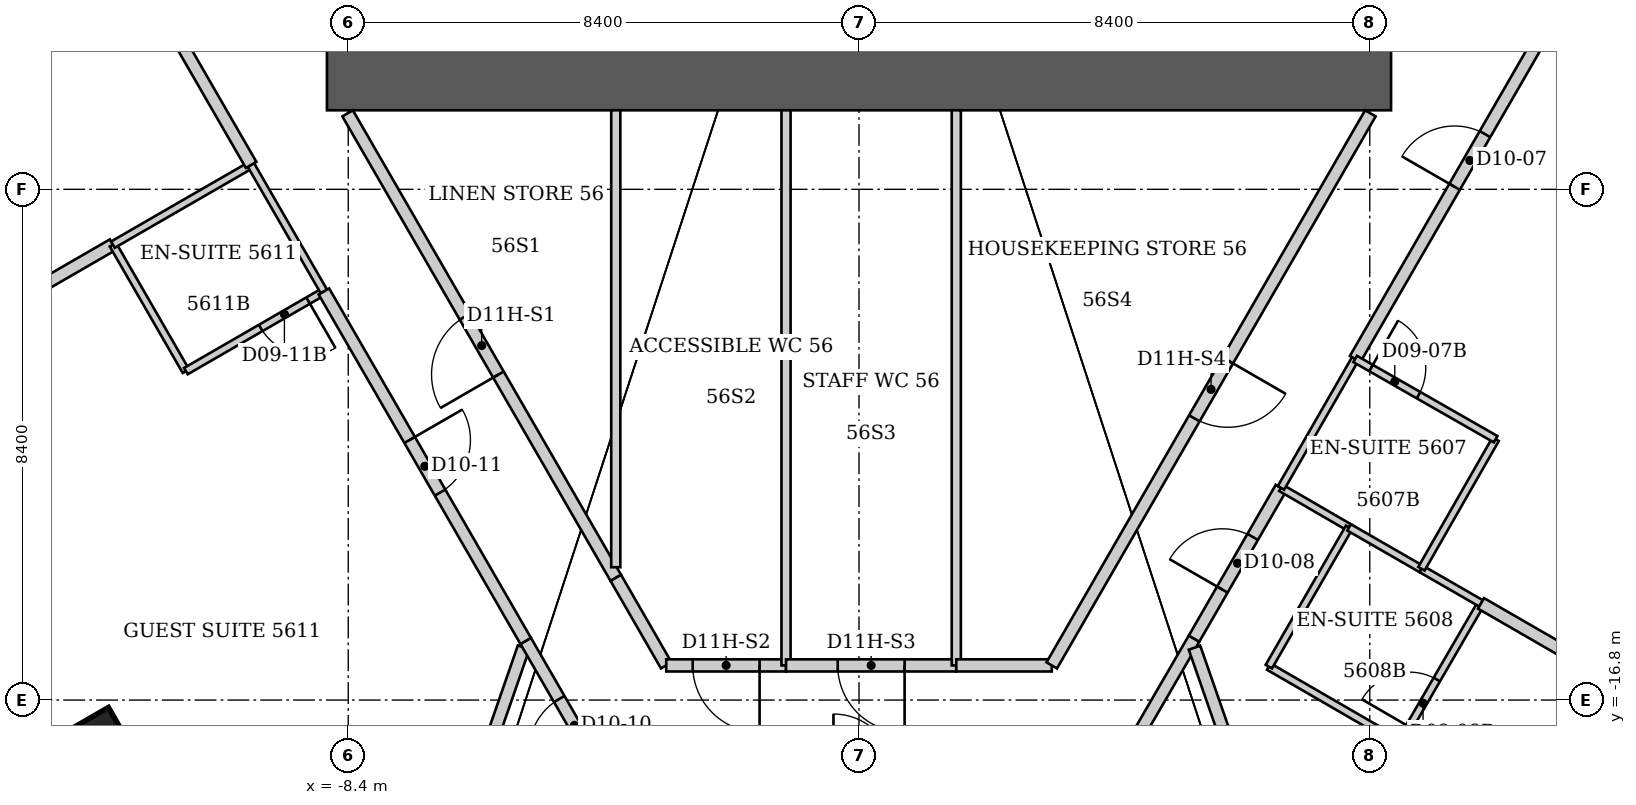
"""IFC4 building model, lengths in metres.
Left out: names, types, materials, properties, quantities, classifications, styles, units other than length and angle.
Written with IfcOpenShell. Run it as: python <this file> out.ifc"""

import sys

from ifc_helpers import new_model, si_unit, direction, frame, frame_2d, origin, origin_2d, place, context, subcontext, project, spatial, rectangle, extrude, element, fill, save


model = new_model("IFC4")
c1 = context("Model", 3, precision=1e-05, world=origin(), true_north=direction((0.0, 1.0)))
c2 = subcontext(c1, "Body", "Model", "MODEL_VIEW")
j1 = project(units=[si_unit("LENGTHUNIT", "METRE"), si_unit("PLANEANGLEUNIT", "RADIAN")], contexts=[c1])
p1 = place(None, origin())
s1 = spatial("IfcSite", under=j1, at=p1, CompositionType="ELEMENT")
p2 = place(p1, origin())
s2 = spatial("IfcBuilding", under=s1, at=p2, CompositionType="ELEMENT")
p3 = place(p2, frame((0.0, 0.0, 225.0)))
s3 = spatial("IfcBuildingStorey", under=s2, at=p3, CompositionType="ELEMENT", Elevation=225.0)
p4 = place(p3, frame((-12.618, -17.945, 0.0), z_axis=(0.0, 0.0, 1.0), x_axis=(-0.866025403784, -0.5, 0.0)))
e1 = element("IfcColumn", 1, at=p4, inside=s3, PredefinedType="COLUMN", context=c2, shape_type="SweptSolid", body=[
    extrude(rectangle(XDim=1.5, YDim=1.5, at=origin_2d()), origin(), (0.0, 0.0, 1.0), 3.8),
])
p5 = place(p3, frame((-8.75, -6.6, 0.0), z_axis=(0.0, 0.0, 1.0), x_axis=(1.0, 0.0, 0.0)))
e2 = element("IfcWall", 2, at=p5, inside=s3, PredefinedType="SHEAR", context=c2, shape_type="SweptSolid", body=[
    extrude(rectangle(XDim=17.5, YDim=1.0, at=frame_2d((8.75, 0.0))), origin(), (0.0, 0.0, 1.0), 3.8),
])
p6 = place(p3, frame((-17.256, -12.19, 0.0), z_axis=(0.0, 0.0, 1.0), x_axis=(0.865937714159, 0.500151852138, 0.0)))
e3 = element("IfcWall", 3, at=p6, inside=s3, PredefinedType="PARTITIONING", context=c2, shape_type="SweptSolid", body=[
    extrude(rectangle(XDim=5.758, YDim=0.2, at=frame_2d((2.879, 0.0))), origin(), (0.0, 0.0, 1.0), 3.038),
])
p7 = place(p3, frame((-12.27, -9.31, 0.0), z_axis=(0.0, 0.0, 1.0), x_axis=(0.499737123639, -0.866177122335, 0.0)))
e4 = element("IfcWall", 4, at=p7, inside=s3, PredefinedType="PARTITIONING", context=c2, shape_type="SweptSolid", body=[
    extrude(rectangle(XDim=2.401, YDim=0.12, at=frame_2d((1.201, 0.0))), origin(), (0.0, 0.0, 1.0), 3.64),
])
p8 = place(p3, frame((-12.27, -9.31, 0.0), z_axis=(0.0, 0.0, 1.0), x_axis=(0.866114241029, 0.499846097802, 0.0)))
e5 = element("IfcWall", 5, at=p8, inside=s3, PredefinedType="PARTITIONING", context=c2, shape_type="SweptSolid", body=[
    extrude(rectangle(XDim=2.621, YDim=0.12, at=frame_2d((1.311, 0.0))), origin(), (0.0, 0.0, 1.0), 3.038),
])
p9 = place(p3, frame((-11.07, -11.39, 0.0), z_axis=(0.0, 0.0, 1.0), x_axis=(0.866154567199, 0.49977621564, 0.0)))
e6 = element("IfcWall", 6, at=p9, inside=s3, PredefinedType="PARTITIONING", context=c2, shape_type="SweptSolid", body=[
    extrude(rectangle(XDim=2.621, YDim=0.12, at=frame_2d((1.311, 0.0))), origin(), (0.0, 0.0, 1.0), 3.64),
])
p10 = place(p9, frame((1.421, 0.0, 0.0)))
e7 = element("IfcOpeningElement", 7, at=p10, cuts=e6, PredefinedType="OPENING", context=c2, shape_type="SweptSolid", body=[
    extrude(rectangle(XDim=0.9, YDim=2.03, at=frame_2d((0.45, 1.015))), frame((0.0, 0.06, 0.0), z_axis=(0.0, -1.0, 0.0), x_axis=(1.0, 0.0, 0.0)), (0.0, 0.0, 1.0), 0.12),
])
p11 = place(p3, frame((-10.0, -8.0, 0.0), z_axis=(0.0, 0.0, 1.0), x_axis=(0.499693115345, -0.866202511239, 0.0)))
e8 = element("IfcWall", 8, at=p11, inside=s3, PredefinedType="PARTITIONING", context=c2, shape_type="SweptSolid", body=[
    extrude(rectangle(XDim=2.401, YDim=0.12, at=frame_2d((1.201, 0.0))), origin(), (0.0, 0.0, 1.0), 3.64),
])
p12 = place(p3, frame((-9.997, -7.998, 0.0), z_axis=(0.0, 0.0, 1.0), x_axis=(-0.499699067435, 0.866199077582, 0.0)))
e9 = element("IfcWall", 9, at=p12, inside=s3, PredefinedType="PARTITIONING", context=c2, shape_type="SweptSolid", body=[
    extrude(rectangle(XDim=7.531, YDim=0.2, at=frame_2d((3.766, 0.0))), origin(), (0.0, 0.0, 1.0), 3.64),
])
p13 = place(p12, frame((3.266, 0.0, 0.0)))
e10 = element("IfcOpeningElement", 10, at=p13, cuts=e9, PredefinedType="OPENING", context=c2, shape_type="SweptSolid", body=[
    extrude(rectangle(XDim=1.0, YDim=2.13, at=frame_2d((0.5, 1.065))), frame((0.0, 0.1, 0.0), z_axis=(0.0, -1.0, 0.0), x_axis=(1.0, 0.0, 0.0)), (0.0, 0.0, 1.0), 0.2),
])
p14 = place(p3, frame((-9.01, -26.012, 0.0), z_axis=(0.0, 0.0, 1.0), x_axis=(0.327582991606, 0.944822408504, 0.0)))
e11 = element("IfcWall", 11, at=p14, inside=s3, PredefinedType="PARTITIONING", context=c2, shape_type="SweptSolid", body=[
    extrude(rectangle(XDim=10.667, YDim=0.2, at=frame_2d((5.333, 0.0))), origin(), (0.0, 0.0, 1.0), 3.64),
])
p15 = place(p3, frame((-8.8, -10.08, 0.0), z_axis=(0.0, 0.0, 1.0), x_axis=(0.500034373799, -0.866005557153, 0.0)))
e12 = element("IfcWall", 12, at=p15, inside=s3, PredefinedType="PARTITIONING", context=c2, shape_type="SweptSolid", body=[
    extrude(rectangle(XDim=6.64, YDim=0.2, at=frame_2d((3.32, 0.0))), origin(), (0.0, 0.0, 1.0), 3.64),
])
p16 = place(p15, frame((2.82, 0.0, 0.0)))
e13 = element("IfcOpeningElement", 13, at=p16, cuts=e12, PredefinedType="OPENING", context=c2, shape_type="SweptSolid", body=[
    extrude(rectangle(XDim=1.0, YDim=2.13, at=frame_2d((0.5, 1.065))), frame((0.0, 0.1, 0.0), z_axis=(0.0, -1.0, 0.0), x_axis=(1.0, 0.0, 0.0)), (0.0, 0.0, 1.0), 0.2),
])
p17 = place(p3, frame((-5.48, -15.83, 0.0), z_axis=(0.0, 0.0, 1.0), x_axis=(0.499963722229, -0.866046347752, 0.0)))
e14 = element("IfcWall", 14, at=p17, inside=s3, PredefinedType="PARTITIONING", context=c2, shape_type="SweptSolid", body=[
    extrude(rectangle(XDim=2.54, YDim=0.2, at=frame_2d((1.27, 0.0))), origin(), (0.0, 0.0, 1.0), 3.64),
])
p18 = place(p17, frame((1.1, 0.0, 0.0)))
e15 = element("IfcOpeningElement", 15, at=p18, cuts=e14, PredefinedType="OPENING", context=c2, shape_type="SweptSolid", body=[
    extrude(rectangle(XDim=1.0, YDim=2.13, at=frame_2d((0.5, 1.065))), frame((0.0, 0.1, 0.0), z_axis=(0.0, -1.0, 0.0), x_axis=(1.0, 0.0, 0.0)), (0.0, 0.0, 1.0), 0.2),
])
p19 = place(p3, frame((-4.0, -14.79, 0.0), z_axis=(0.0, 0.0, 1.0), x_axis=(-0.499916512745, 0.866073599808, 0.0)))
e16 = element("IfcWall", 16, at=p19, inside=s3, PredefinedType="PARTITIONING", context=c2, shape_type="SweptSolid", body=[
    extrude(rectangle(XDim=8.821, YDim=0.2, at=frame_2d((4.411, 0.0))), origin(), (0.0, 0.0, 1.0), 3.64),
])
p20 = place(p19, frame((3.861, 0.0, 0.0)))
e17 = element("IfcOpeningElement", 17, at=p20, cuts=e16, PredefinedType="OPENING", context=c2, shape_type="SweptSolid", body=[
    extrude(rectangle(XDim=1.1, YDim=2.2, at=frame_2d((0.55, 1.1))), frame((0.0, 0.1, 0.0), z_axis=(0.0, -1.0, 0.0), x_axis=(1.0, 0.0, 0.0)), (0.0, 0.0, 1.0), 0.2),
])
p21 = place(p3, frame((-4.0, -7.1, 0.0), z_axis=(0.0, 0.0, 1.0), x_axis=(0.0, -1.0, 0.0)))
e18 = element("IfcWall", 18, at=p21, inside=s3, PredefinedType="PARTITIONING", context=c2, shape_type="SweptSolid", body=[
    extrude(rectangle(XDim=7.515, YDim=0.15, at=frame_2d((3.757, 0.0))), origin(), (0.0, 0.0, 1.0), 3.64),
])
p22 = place(p3, frame((-3.17, -16.23, 0.0), z_axis=(0.0, 0.0, 1.0), x_axis=(-0.499425709803, 0.866356716594, 0.0)))
e19 = element("IfcWall", 19, at=p22, inside=s3, PredefinedType="PARTITIONING", context=c2, shape_type="SweptSolid", body=[
    extrude(rectangle(XDim=1.662, YDim=0.2, at=frame_2d((0.831, 0.0))), origin(), (0.0, 0.0, 1.0), 3.64),
])
p23 = place(p3, frame((-1.2, -16.23, 0.0), z_axis=(0.0, 0.0, 1.0), x_axis=(-1.0, 0.0, 0.0)))
e20 = element("IfcWall", 20, at=p23, inside=s3, PredefinedType="PARTITIONING", context=c2, shape_type="SweptSolid", body=[
    extrude(rectangle(XDim=1.97, YDim=0.2, at=frame_2d((0.985, 0.0))), origin(), (0.0, 0.0, 1.0), 3.64),
])
p24 = place(p23, frame((0.435, 0.0, 0.0)))
e21 = element("IfcOpeningElement", 21, at=p24, cuts=e20, PredefinedType="OPENING", context=c2, shape_type="SweptSolid", body=[
    extrude(rectangle(XDim=1.1, YDim=2.2, at=frame_2d((0.55, 1.1))), frame((0.0, 0.1, 0.0), z_axis=(0.0, -1.0, 0.0), x_axis=(1.0, 0.0, 0.0)), (0.0, 0.0, 1.0), 0.2),
])
p25 = place(p3, frame((-1.2, -7.1, 0.0), z_axis=(0.0, 0.0, 1.0), x_axis=(0.0, -1.0, 0.0)))
e22 = element("IfcWall", 22, at=p25, inside=s3, PredefinedType="PARTITIONING", context=c2, shape_type="SweptSolid", body=[
    extrude(rectangle(XDim=9.13, YDim=0.15, at=frame_2d((4.565, 0.0))), origin(), (0.0, 0.0, 1.0), 3.64),
])
p26 = place(p3, frame((1.6, -16.23, 0.0), z_axis=(0.0, 0.0, 1.0), x_axis=(-1.0, 0.0, 0.0)))
e23 = element("IfcWall", 23, at=p26, inside=s3, PredefinedType="PARTITIONING", context=c2, shape_type="SweptSolid", body=[
    extrude(rectangle(XDim=2.8, YDim=0.2, at=frame_2d((1.4, 0.0))), origin(), (0.0, 0.0, 1.0), 3.64),
])
p27 = place(p26, frame((0.85, 0.0, 0.0)))
e24 = element("IfcOpeningElement", 24, at=p27, cuts=e23, PredefinedType="OPENING", context=c2, shape_type="SweptSolid", body=[
    extrude(rectangle(XDim=1.1, YDim=2.2, at=frame_2d((0.55, 1.1))), frame((0.0, 0.1, 0.0), z_axis=(0.0, -1.0, 0.0), x_axis=(1.0, 0.0, 0.0)), (0.0, 0.0, 1.0), 0.2),
])
p28 = place(p3, frame((1.6, -7.1, 0.0), z_axis=(0.0, 0.0, 1.0), x_axis=(0.0, -1.0, 0.0)))
e25 = element("IfcWall", 25, at=p28, inside=s3, PredefinedType="PARTITIONING", context=c2, shape_type="SweptSolid", body=[
    extrude(rectangle(XDim=9.13, YDim=0.15, at=frame_2d((4.565, 0.0))), origin(), (0.0, 0.0, 1.0), 3.64),
])
p29 = place(p3, frame((3.17, -16.23, 0.0), z_axis=(0.0, 0.0, 1.0), x_axis=(-1.0, 0.0, 0.0)))
e26 = element("IfcWall", 26, at=p29, inside=s3, PredefinedType="PARTITIONING", context=c2, shape_type="SweptSolid", body=[
    extrude(rectangle(XDim=1.57, YDim=0.2, at=frame_2d((0.785, 0.0))), origin(), (0.0, 0.0, 1.0), 3.64),
])
p30 = place(p3, frame((5.51, -15.79, 0.0), z_axis=(0.0, 0.0, 1.0), x_axis=(-0.501964949025, -0.864887963814, 0.0)))
e27 = element("IfcWall", 27, at=p30, inside=s3, PredefinedType="PARTITIONING", context=c2, shape_type="SweptSolid", body=[
    extrude(rectangle(XDim=2.59, YDim=0.2, at=frame_2d((1.295, 0.0))), origin(), (0.0, 0.0, 1.0), 3.64),
])
p31 = place(p3, frame((5.51, -15.79, 0.0), z_axis=(0.0, 0.0, 1.0), x_axis=(0.499505868716, 0.866310502717, 0.0)))
e28 = element("IfcWall", 28, at=p31, inside=s3, PredefinedType="PARTITIONING", context=c2, shape_type="SweptSolid", body=[
    extrude(rectangle(XDim=2.863, YDim=0.2, at=frame_2d((1.431, 0.0))), origin(), (0.0, 0.0, 1.0), 3.64),
])
p32 = place(p31, frame((0.931, 0.0, 0.0)))
e29 = element("IfcOpeningElement", 29, at=p32, cuts=e28, PredefinedType="OPENING", context=c2, shape_type="SweptSolid", body=[
    extrude(rectangle(XDim=1.0, YDim=2.13, at=frame_2d((0.5, 1.065))), frame((0.0, 0.1, 0.0), z_axis=(0.0, -1.0, 0.0), x_axis=(1.0, 0.0, 0.0)), (0.0, 0.0, 1.0), 0.2),
])
p33 = place(p3, frame((5.518, -15.939, 0.0), z_axis=(0.0, 0.0, 1.0), x_axis=(0.328696386896, -0.94443564378, 0.0)))
e30 = element("IfcWall", 30, at=p33, inside=s3, PredefinedType="PARTITIONING", context=c2, shape_type="SweptSolid", body=[
    extrude(rectangle(XDim=2.532, YDim=0.2, at=frame_2d((1.266, 0.0))), origin(), (0.0, 0.0, 1.0), 3.64),
])
p34 = place(p3, frame((6.74, -16.25, 0.0), z_axis=(0.0, 0.0, 1.0), x_axis=(0.865508881864, -0.500893576935, 0.0)))
e31 = element("IfcWall", 31, at=p34, inside=s3, PredefinedType="PARTITIONING", context=c2, shape_type="SweptSolid", body=[
    extrude(rectangle(XDim=2.496, YDim=0.12, at=frame_2d((1.248, 0.0))), origin(), (0.0, 0.0, 1.0), 3.64),
])
p35 = place(p3, frame((6.94, -13.31, 0.0), z_axis=(0.0, 0.0, 1.0), x_axis=(0.864952631286, -0.501853510132, 0.0)))
e32 = element("IfcWall", 32, at=p35, inside=s3, PredefinedType="PARTITIONING", context=c2, shape_type="SweptSolid", body=[
    extrude(rectangle(XDim=1.295, YDim=0.12, at=frame_2d((0.647, 0.0))), origin(), (0.0, 0.0, 1.0), 3.64),
])
p36 = place(p3, frame((6.94, -13.31, 0.0), z_axis=(0.0, 0.0, 1.0), x_axis=(0.498748634132, 0.866746675766, 0.0)))
e33 = element("IfcWall", 33, at=p36, inside=s3, PredefinedType="PARTITIONING", context=c2, shape_type="SweptSolid", body=[
    extrude(rectangle(XDim=2.446, YDim=0.12, at=frame_2d((1.223, 0.0))), origin(), (0.0, 0.0, 1.0), 3.64),
])
p37 = place(p3, frame((8.06, -13.96, 0.0), z_axis=(0.0, 0.0, 1.0), x_axis=(-0.499407914056, -0.866366975004, 0.0)))
e34 = element("IfcWall", 34, at=p37, inside=s3, PredefinedType="PARTITIONING", context=c2, shape_type="SweptSolid", body=[
    extrude(rectangle(XDim=2.643, YDim=0.12, at=frame_2d((1.322, 0.0))), origin(), (0.0, 0.0, 1.0), 3.64),
])
p38 = place(p3, frame((8.06, -13.96, 0.0), z_axis=(0.0, 0.0, 1.0), x_axis=(0.866505716338, -0.499167149914, 0.0)))
e35 = element("IfcWall", 35, at=p38, inside=s3, PredefinedType="PARTITIONING", context=c2, shape_type="SweptSolid", body=[
    extrude(rectangle(XDim=1.37, YDim=0.12, at=frame_2d((0.685, 0.0))), origin(), (0.0, 0.0, 1.0), 3.64),
])
p39 = place(p3, frame((8.16, -11.19, 0.0), z_axis=(0.0, 0.0, 1.0), x_axis=(0.500004606796, 0.866022744033, 0.0)))
e36 = element("IfcWall", 36, at=p39, inside=s3, PredefinedType="PARTITIONING", context=c2, shape_type="SweptSolid", body=[
    extrude(rectangle(XDim=7.54, YDim=0.2, at=frame_2d((3.77, 0.0))), origin(), (0.0, 0.0, 1.0), 3.64),
])
p40 = place(p39, frame((3.27, 0.0, 0.0)))
e37 = element("IfcOpeningElement", 37, at=p40, cuts=e36, PredefinedType="OPENING", context=c2, shape_type="SweptSolid", body=[
    extrude(rectangle(XDim=1.0, YDim=2.13, at=frame_2d((0.5, 1.065))), frame((0.0, 0.1, 0.0), z_axis=(0.0, -1.0, 0.0), x_axis=(1.0, 0.0, 0.0)), (0.0, 0.0, 1.0), 0.2),
])
p41 = place(p3, frame((8.41, -7.15, 0.0), z_axis=(0.0, 0.0, 1.0), x_axis=(-0.499828628176, -0.866124322748, 0.0)))
e38 = element("IfcWall", 38, at=p41, inside=s3, PredefinedType="PARTITIONING", context=c2, shape_type="SweptSolid", body=[
    extrude(rectangle(XDim=10.484, YDim=0.2, at=frame_2d((5.242, 0.0))), origin(), (0.0, 0.0, 1.0), 3.64),
])
p42 = place(p41, frame((4.692, 0.0, 0.0)))
e39 = element("IfcOpeningElement", 39, at=p42, cuts=e38, PredefinedType="OPENING", context=c2, shape_type="SweptSolid", body=[
    extrude(rectangle(XDim=1.1, YDim=2.2, at=frame_2d((0.55, 1.1))), frame((0.0, 0.1, 0.0), z_axis=(0.0, -1.0, 0.0), x_axis=(1.0, 0.0, 0.0)), (0.0, 0.0, 1.0), 0.2),
])
p43 = place(p3, frame((8.9, -17.5, 0.0), z_axis=(0.0, 0.0, 1.0), x_axis=(0.502242265546, 0.864726954997, 0.0)))
e40 = element("IfcWall", 40, at=p43, inside=s3, PredefinedType="PARTITIONING", context=c2, shape_type="SweptSolid", body=[
    extrude(rectangle(XDim=2.648, YDim=0.12, at=frame_2d((1.324, 0.0))), origin(), (0.0, 0.0, 1.0), 3.64),
])
p44 = place(p43, frame((0.3, 0.0, 0.0)))
e41 = element("IfcOpeningElement", 41, at=p44, cuts=e40, PredefinedType="OPENING", context=c2, shape_type="SweptSolid", body=[
    extrude(rectangle(XDim=0.9, YDim=2.03, at=frame_2d((0.45, 1.015))), frame((0.0, 0.06, 0.0), z_axis=(0.0, -1.0, 0.0), x_axis=(1.0, 0.0, 0.0)), (0.0, 0.0, 1.0), 0.12),
])
p45 = place(p3, frame((9.248, -14.644, 0.0), z_axis=(0.0, 0.0, 1.0), x_axis=(0.866515213998, -0.499150662536, 0.0)))
e42 = element("IfcWall", 42, at=p45, inside=s3, PredefinedType="PARTITIONING", context=c2, shape_type="SweptSolid", body=[
    extrude(rectangle(XDim=1.134, YDim=0.12, at=frame_2d((0.567, 0.0))), origin(), (0.0, 0.0, 1.0), 3.64),
])
p46 = place(p3, frame((9.25, -14.64, 0.0), z_axis=(0.0, 0.0, 1.0), x_axis=(0.497027744361, 0.86773464915, 0.0)))
e43 = element("IfcWall", 43, at=p46, inside=s3, PredefinedType="PARTITIONING", context=c2, shape_type="SweptSolid", body=[
    extrude(rectangle(XDim=2.455, YDim=0.12, at=frame_2d((1.227, 0.0))), origin(), (0.0, 0.0, 1.0), 3.64),
])
p47 = place(p3, frame((10.23, -15.21, 0.0), z_axis=(0.0, 0.0, 1.0), x_axis=(0.86600796803, -0.500030198396, 0.0)))
e44 = element("IfcWall", 44, at=p47, inside=s3, PredefinedType="PARTITIONING", context=c2, shape_type="SweptSolid", body=[
    extrude(rectangle(XDim=4.67, YDim=0.2, at=frame_2d((2.335, 0.0))), origin(), (0.0, 0.0, 1.0), 3.64),
])
p48 = place(p3, frame((10.47, -12.51, 0.0), z_axis=(0.0, 0.0, 1.0), x_axis=(-0.86821490448, 0.49618835097, 0.0)))
e45 = element("IfcWall", 45, at=p48, inside=s3, PredefinedType="PARTITIONING", context=c2, shape_type="SweptSolid", body=[
    extrude(rectangle(XDim=2.66, YDim=0.12, at=frame_2d((1.33, 0.0))), origin(), (0.0, 0.0, 1.0), 2.878),
])
p49 = place(p48, frame((1.46, 0.0, 0.0)))
e46 = element("IfcOpeningElement", 46, at=p49, cuts=e45, PredefinedType="OPENING", context=c2, shape_type="SweptSolid", body=[
    extrude(rectangle(XDim=0.9, YDim=2.03, at=frame_2d((0.45, 1.015))), frame((0.0, 0.06, 0.0), z_axis=(0.0, -1.0, 0.0), x_axis=(1.0, 0.0, 0.0)), (0.0, 0.0, 1.0), 0.12),
])
p50 = place(p40, origin())
e47 = element("IfcDoor", 47, at=p50, inside=s3, OperationType="SINGLE_SWING_LEFT", PredefinedType="DOOR", context=c2, shape_type="SweptSolid", body=[
    extrude(rectangle(XDim=1.0, YDim=2.13, at=frame_2d((0.5, 1.065))), frame((0.0, 0.025, 0.0), z_axis=(0.0, -1.0, 0.0), x_axis=(1.0, 0.0, 0.0)), (0.0, 0.0, 1.0), 0.05),
])
fill(e37, e47)
p51 = place(p49, origin())
e48 = element("IfcDoor", 48, at=p51, inside=s3, OperationType="SINGLE_SWING_RIGHT", PredefinedType="DOOR", context=c2, shape_type="SweptSolid", body=[
    extrude(rectangle(XDim=0.9, YDim=2.03, at=frame_2d((0.45, 1.015))), frame((0.0, 0.025, 0.0), z_axis=(0.0, -1.0, 0.0), x_axis=(1.0, 0.0, 0.0)), (0.0, 0.0, 1.0), 0.05),
])
fill(e46, e48)
p52 = place(p32, origin())
e49 = element("IfcDoor", 49, at=p52, inside=s3, OperationType="SINGLE_SWING_LEFT", PredefinedType="DOOR", context=c2, shape_type="SweptSolid", body=[
    extrude(rectangle(XDim=1.0, YDim=2.13, at=frame_2d((0.5, 1.065))), frame((0.0, 0.025, 0.0), z_axis=(0.0, -1.0, 0.0), x_axis=(1.0, 0.0, 0.0)), (0.0, 0.0, 1.0), 0.05),
])
fill(e29, e49)
p53 = place(p44, origin())
e50 = element("IfcDoor", 50, at=p53, inside=s3, OperationType="SINGLE_SWING_LEFT", PredefinedType="DOOR", context=c2, shape_type="SweptSolid", body=[
    extrude(rectangle(XDim=0.9, YDim=2.03, at=frame_2d((0.45, 1.015))), frame((0.0, 0.025, 0.0), z_axis=(0.0, -1.0, 0.0), x_axis=(1.0, 0.0, 0.0)), (0.0, 0.0, 1.0), 0.05),
])
fill(e41, e50)
p54 = place(p18, origin())
e51 = element("IfcDoor", 51, at=p54, inside=s3, OperationType="SINGLE_SWING_RIGHT", PredefinedType="DOOR", context=c2, shape_type="SweptSolid", body=[
    extrude(rectangle(XDim=1.0, YDim=2.13, at=frame_2d((0.5, 1.065))), frame((0.0, 0.025, 0.0), z_axis=(0.0, -1.0, 0.0), x_axis=(1.0, 0.0, 0.0)), (0.0, 0.0, 1.0), 0.05),
])
fill(e15, e51)
p55 = place(p16, origin())
e52 = element("IfcDoor", 52, at=p55, inside=s3, OperationType="SINGLE_SWING_LEFT", PredefinedType="DOOR", context=c2, shape_type="SweptSolid", body=[
    extrude(rectangle(XDim=1.0, YDim=2.13, at=frame_2d((0.5, 1.065))), frame((0.0, 0.025, 0.0), z_axis=(0.0, -1.0, 0.0), x_axis=(1.0, 0.0, 0.0)), (0.0, 0.0, 1.0), 0.05),
])
fill(e13, e52)
p56 = place(p10, origin())
e53 = element("IfcDoor", 53, at=p56, inside=s3, OperationType="SINGLE_SWING_RIGHT", PredefinedType="DOOR", context=c2, shape_type="SweptSolid", body=[
    extrude(rectangle(XDim=0.9, YDim=2.03, at=frame_2d((0.45, 1.015))), frame((0.0, 0.025, 0.0), z_axis=(0.0, -1.0, 0.0), x_axis=(1.0, 0.0, 0.0)), (0.0, 0.0, 1.0), 0.05),
])
fill(e7, e53)
p57 = place(p20, origin())
e54 = element("IfcDoor", 54, at=p57, inside=s3, OperationType="SINGLE_SWING_LEFT", PredefinedType="DOOR", context=c2, shape_type="SweptSolid", body=[
    extrude(rectangle(XDim=1.1, YDim=2.2, at=frame_2d((0.55, 1.1))), frame((0.0, 0.025, 0.0), z_axis=(0.0, -1.0, 0.0), x_axis=(1.0, 0.0, 0.0)), (0.0, 0.0, 1.0), 0.05),
])
fill(e17, e54)
p58 = place(p24, origin())
e55 = element("IfcDoor", 55, at=p58, inside=s3, OperationType="SINGLE_SWING_LEFT", PredefinedType="DOOR", context=c2, shape_type="SweptSolid", body=[
    extrude(rectangle(XDim=1.1, YDim=2.2, at=frame_2d((0.55, 1.1))), frame((0.0, 0.025, 0.0), z_axis=(0.0, -1.0, 0.0), x_axis=(1.0, 0.0, 0.0)), (0.0, 0.0, 1.0), 0.05),
])
fill(e21, e55)
p59 = place(p27, origin())
e56 = element("IfcDoor", 56, at=p59, inside=s3, OperationType="SINGLE_SWING_LEFT", PredefinedType="DOOR", context=c2, shape_type="SweptSolid", body=[
    extrude(rectangle(XDim=1.1, YDim=2.2, at=frame_2d((0.55, 1.1))), frame((0.0, 0.025, 0.0), z_axis=(0.0, -1.0, 0.0), x_axis=(1.0, 0.0, 0.0)), (0.0, 0.0, 1.0), 0.05),
])
fill(e24, e56)
p60 = place(p42, origin())
e57 = element("IfcDoor", 57, at=p60, inside=s3, OperationType="SINGLE_SWING_LEFT", PredefinedType="DOOR", context=c2, shape_type="SweptSolid", body=[
    extrude(rectangle(XDim=1.1, YDim=2.2, at=frame_2d((0.55, 1.1))), frame((0.0, 0.025, 0.0), z_axis=(0.0, -1.0, 0.0), x_axis=(1.0, 0.0, 0.0)), (0.0, 0.0, 1.0), 0.05),
])
fill(e39, e57)
save(model, sys.argv[1])
